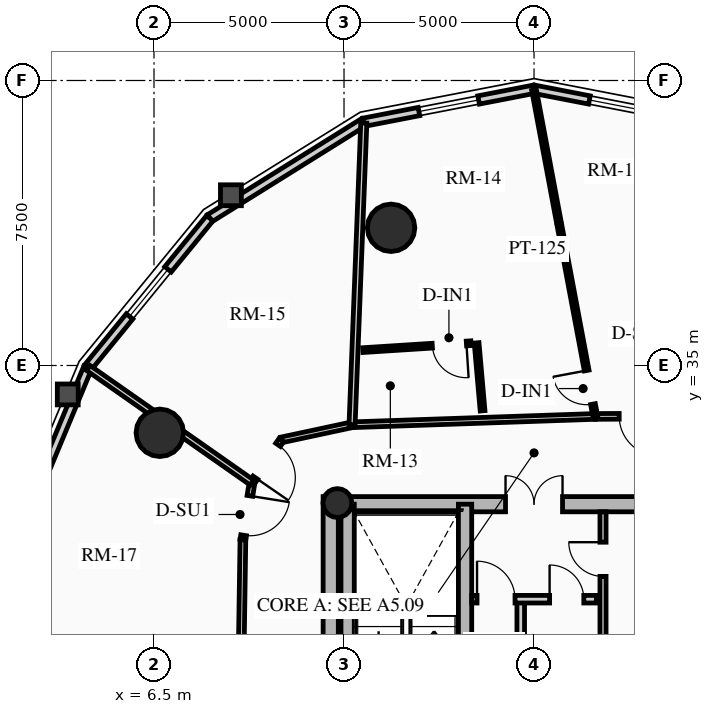
"""IFC4 building model, lengths in metres.
Left out: names, types, materials, properties, quantities, classifications, styles, units other than length and angle.
Written with IfcOpenShell. Run it as: python <this file> out.ifc"""

import sys

from ifc_helpers import new_model, si_unit, direction, frame, frame_2d, origin, origin_2d, place, context, subcontext, project, spatial, rectangle, circle, hollow_circle, extrude, source, transform, mapped, element, fill, save


model = new_model("IFC4")
c1 = context("Model", 3, precision=1e-05, world=origin(), true_north=direction((0.0, 1.0)))
c2 = subcontext(c1, "Body", "Model", "MODEL_VIEW")
j1 = project(units=[si_unit("LENGTHUNIT", "METRE"), si_unit("PLANEANGLEUNIT", "RADIAN")], contexts=[c1])
p1 = place(None, origin())
s1 = spatial("IfcSite", under=j1, at=p1, CompositionType="ELEMENT")
p2 = place(p1, origin())
s2 = spatial("IfcBuilding", under=s1, at=p2, CompositionType="ELEMENT")
p3 = place(p2, frame((0.0, 0.0, 157.42)))
s3 = spatial("IfcBuildingStorey", under=s2, at=p3, CompositionType="ELEMENT", Elevation=157.42)
p4 = place(p3, frame((11.15, 17.45, 0.0), z_axis=(0.0, 0.0, 1.0), x_axis=(0.0, 1.0, 0.0)))
e1 = element("IfcWall", 1, at=p4, inside=s3, PredefinedType="SHEAR", context=c2, shape_type="SweptSolid", body=[
    extrude(rectangle(XDim=14.1, YDim=0.4, at=frame_2d((7.05, 0.0))), origin(), (0.0, 0.0, 1.0), 2.91),
])
p5 = place(p3, frame((11.15, 31.35, 0.0), z_axis=(0.0, 0.0, 1.0), x_axis=(1.0, 0.0, 0.0)))
e2 = element("IfcWall", 2, at=p5, inside=s3, PredefinedType="SHEAR", context=c2, shape_type="SweptSolid", body=[
    extrude(rectangle(XDim=10.7, YDim=0.4, at=frame_2d((5.35, 0.0))), origin(), (0.0, 0.0, 1.0), 2.91),
])
m1 = source(origin(), c2, "Body", "SweptSolid", [
    extrude(rectangle(XDim=1.5, YDim=2.02, at=frame_2d((0.75, 1.01))), frame((0.0, 0.21, 0.0), z_axis=(0.0, -1.0, 0.0), x_axis=(1.0, 0.0, 0.0)), (0.0, 0.0, 1.0), 0.42),
])
p6 = place(p5, frame((4.6, 0.0, 0.0)))
e3 = element("IfcOpeningElement", 3, at=p6, cuts=e2, PredefinedType="OPENING", context=c2, shape_type="MappedRepresentation", body=[
    mapped(m1, transform((0.0, 0.0, 0.0), x_axis=(1.0, 0.0, 0.0), y_axis=(0.0, 1.0, 0.0), z_axis=(0.0, 0.0, 1.0), scale=1.0)),
])
p7 = place(p3, frame((14.685, 17.65, 0.0), z_axis=(0.0, 0.0, 1.0), x_axis=(0.0, 1.0, 0.0)))
e4 = element("IfcWall", 4, at=p7, inside=s3, PredefinedType="SHEAR", context=c2, shape_type="SweptSolid", body=[
    extrude(rectangle(XDim=13.7, YDim=0.35, at=frame_2d((6.85, 0.0))), origin(), (0.0, 0.0, 1.0), 2.91),
])
m2 = source(origin(), c2, "Body", "SweptSolid", [
    extrude(rectangle(XDim=1.1, YDim=2.015, at=frame_2d((0.55, 1.007))), frame((0.0, 0.185, 0.0), z_axis=(0.0, -1.0, 0.0), x_axis=(1.0, 0.0, 0.0)), (0.0, 0.0, 1.0), 0.37),
])
p8 = place(p7, frame((4.85, 0.0, 0.0)))
e5 = element("IfcOpeningElement", 5, at=p8, cuts=e4, PredefinedType="OPENING", context=c2, shape_type="MappedRepresentation", body=[
    mapped(m2, transform((0.0, 0.0, 0.0), x_axis=(1.0, 0.0, 0.0), y_axis=(0.0, 1.0, 0.0), z_axis=(0.0, 0.0, 1.0), scale=1.0)),
])
p9 = place(p7, frame((0.625, 0.0, 0.0)))
e6 = element("IfcOpeningElement", 6, at=p9, cuts=e4, PredefinedType="OPENING", context=c2, shape_type="MappedRepresentation", body=[
    mapped(m2, transform((0.0, 0.0, 0.0), x_axis=(1.0, 0.0, 0.0), y_axis=(0.0, 1.0, 0.0), z_axis=(0.0, 0.0, 1.0), scale=1.0)),
])
p10 = place(p7, frame((2.625, 0.0, 0.0)))
e7 = element("IfcOpeningElement", 7, at=p10, cuts=e4, PredefinedType="OPENING", context=c2, shape_type="MappedRepresentation", body=[
    mapped(m2, transform((0.0, 0.0, 0.0), x_axis=(1.0, 0.0, 0.0), y_axis=(0.0, 1.0, 0.0), z_axis=(0.0, 0.0, 1.0), scale=1.0)),
])
m3 = source(origin(), c2, "Body", "SweptSolid", [
    extrude(rectangle(XDim=1.15, YDim=2.02, at=frame_2d((0.575, 1.01))), frame((0.0, 0.185, 0.0), z_axis=(0.0, -1.0, 0.0), x_axis=(1.0, 0.0, 0.0)), (0.0, 0.0, 1.0), 0.37),
])
p11 = place(p7, frame((7.27, 0.0, 0.0)))
e8 = element("IfcOpeningElement", 8, at=p11, cuts=e4, PredefinedType="OPENING", context=c2, shape_type="MappedRepresentation", body=[
    mapped(m3, transform((0.0, 0.0, 0.0), x_axis=(1.0, 0.0, 0.0), y_axis=(0.0, 1.0, 0.0), z_axis=(0.0, 0.0, 1.0), scale=1.0)),
])
p12 = place(p3, frame((11.595, 24.655, 0.0), z_axis=(0.0, 0.0, 1.0), x_axis=(0.0, 1.0, 0.0)))
e9 = element("IfcWall", 9, at=p12, inside=s3, PredefinedType="SHEAR", context=c2, shape_type="SweptSolid", body=[
    extrude(rectangle(XDim=6.695, YDim=0.35, at=frame_2d((3.348, 0.0))), origin(), (0.0, 0.0, 1.0), 2.91),
])
p13 = place(p3, frame((11.325, 31.38, 0.0), z_axis=(0.0, 0.0, 1.0), x_axis=(1.0, 0.0, 0.0)))
e10 = element("IfcColumn", 10, at=p13, inside=s3, PredefinedType="COLUMN", context=c2, shape_type="SweptSolid", body=[
    extrude(hollow_circle(Radius=0.38, WallThickness=0.032, at=origin_2d()), origin(), (0.0, 0.0, 1.0), 2.91),
])
for number, where, z_axis, x_axis in (
    (11, (12.739, 38.623, 0.0), (0.0, 0.0, 1.0), (1.0, 0.0, 0.0)),
    (12, (6.653, 33.229, 0.0), (0.0, 0.0, 1.0), (1.0, 0.0, 0.0)),
):
    element("IfcColumn", number, at=place(p3, frame(where, z_axis=z_axis, x_axis=x_axis)), inside=s3, PredefinedType="USERDEFINED", context=c2, shape_type="SweptSolid", body=[
        extrude(circle(Radius=0.625, at=origin_2d()), origin(), (0.0, 0.0, 1.0), 2.91),
    ])
p14 = place(p3, frame((16.5, 42.27, 0.0), z_axis=(0.0, 0.0, 1.0), x_axis=(0.981718699963, -0.190337579429, 0.0)))
e13 = element("IfcWall", 13, at=p14, inside=s3, PredefinedType="SOLIDWALL", context=c2, shape_type="SweptSolid", body=[
    extrude(rectangle(XDim=4.569, YDim=0.22, at=frame_2d((2.284, 0.0))), origin(), (0.0, 0.0, 1.0), 2.245),
])
m4 = source(origin(), c2, "Body", "SweptSolid", [
    extrude(rectangle(XDim=1.6, YDim=1.3, at=frame_2d((0.8, 0.65))), frame((0.0, 0.12, 0.0), z_axis=(0.0, -1.0, 0.0), x_axis=(1.0, 0.0, 0.0)), (0.0, 0.0, 1.0), 0.24),
])
p15 = place(p14, frame((1.484, 0.0, 0.65)))
e14 = element("IfcOpeningElement", 14, at=p15, cuts=e13, PredefinedType="OPENING", context=c2, shape_type="MappedRepresentation", body=[
    mapped(m4, transform((0.0, 0.0, 0.0), x_axis=(1.0, 0.0, 0.0), y_axis=(0.0, 1.0, 0.0), z_axis=(0.0, 0.0, 1.0), scale=1.0)),
])
p16 = place(p3, frame((12.015, 41.4, 0.0), z_axis=(0.0, 0.0, 1.0), x_axis=(0.981718699963, 0.190337579429, 0.0)))
e15 = element("IfcWall", 15, at=p16, inside=s3, PredefinedType="SOLIDWALL", context=c2, shape_type="SweptSolid", body=[
    extrude(rectangle(XDim=4.569, YDim=0.22, at=frame_2d((2.284, 0.0))), origin(), (0.0, 0.0, 1.0), 2.245),
])
p17 = place(p16, frame((1.484, 0.0, 0.65)))
e16 = element("IfcOpeningElement", 16, at=p17, cuts=e15, PredefinedType="OPENING", context=c2, shape_type="MappedRepresentation", body=[
    mapped(m4, transform((0.0, 0.0, 0.0), x_axis=(1.0, 0.0, 0.0), y_axis=(0.0, 1.0, 0.0), z_axis=(0.0, 0.0, 1.0), scale=1.0)),
])
p18 = place(p3, frame((7.968, 38.876, 0.0), z_axis=(0.0, 0.0, 1.0), x_axis=(0.848452391194, 0.529271707044, 0.0)))
e17 = element("IfcWall", 17, at=p18, inside=s3, PredefinedType="SOLIDWALL", context=c2, shape_type="SweptSolid", body=[
    extrude(rectangle(XDim=4.769, YDim=0.22, at=frame_2d((2.385, 0.0))), origin(), (0.0, 0.0, 1.0), 2.245),
])
p19 = place(p3, frame((4.757, 34.945, 0.0), z_axis=(0.0, 0.0, 1.0), x_axis=(0.632598524901, 0.774479894053, 0.0)))
e18 = element("IfcWall", 18, at=p19, inside=s3, PredefinedType="SOLIDWALL", context=c2, shape_type="SweptSolid", body=[
    extrude(rectangle(XDim=5.076, YDim=0.22, at=frame_2d((2.538, 0.0))), origin(), (0.0, 0.0, 1.0), 2.245),
])
p20 = place(p19, frame((1.738, 0.0, 0.65)))
e19 = element("IfcOpeningElement", 19, at=p20, cuts=e18, PredefinedType="OPENING", context=c2, shape_type="MappedRepresentation", body=[
    mapped(m4, transform((0.0, 0.0, 0.0), x_axis=(1.0, 0.0, 0.0), y_axis=(0.0, 1.0, 0.0), z_axis=(0.0, 0.0, 1.0), scale=1.0)),
])
p21 = place(p3, frame((2.695, 29.991, 0.0), z_axis=(0.0, 0.0, 1.0), x_axis=(0.384259959969, 0.923224936386, 0.0)))
e20 = element("IfcWall", 20, at=p21, inside=s3, PredefinedType="SOLIDWALL", context=c2, shape_type="SweptSolid", body=[
    extrude(rectangle(XDim=5.365, YDim=0.22, at=frame_2d((2.683, 0.0))), origin(), (0.0, 0.0, 1.0), 2.245),
])
p22 = place(p3, frame((16.15, 26.45, 0.0), z_axis=(0.0, 0.0, 1.0), x_axis=(0.0, 1.0, 0.0)))
e21 = element("IfcWall", 21, at=p22, inside=s3, PredefinedType="PARTITIONING", context=c2, shape_type="SweptSolid", body=[
    extrude(rectangle(XDim=2.4, YDim=0.2, at=frame_2d((1.2, 0.0))), origin(), (0.0, 0.0, 1.0), 2.675),
])
p23 = place(p3, frame((14.86, 28.85, 0.0), z_axis=(0.0, 0.0, 1.0), x_axis=(1.0, 0.0, 0.0)))
e22 = element("IfcWall", 22, at=p23, inside=s3, PredefinedType="PARTITIONING", context=c2, shape_type="SweptSolid", body=[
    extrude(rectangle(XDim=3.28, YDim=0.2, at=frame_2d((1.64, 0.0))), origin(), (0.0, 0.0, 1.0), 2.675),
])
m5 = source(origin(), c2, "Body", "SweptSolid", [
    extrude(rectangle(XDim=1.0, YDim=2.015, at=frame_2d((0.5, 1.007))), frame((0.0, 0.11, 0.0), z_axis=(0.0, -1.0, 0.0), x_axis=(1.0, 0.0, 0.0)), (0.0, 0.0, 1.0), 0.22),
])
p24 = place(p23, frame((0.14, 0.0, 0.0)))
e23 = element("IfcOpeningElement", 23, at=p24, cuts=e22, PredefinedType="OPENING", context=c2, shape_type="MappedRepresentation", body=[
    mapped(m5, transform((0.0, 0.0, 0.0), x_axis=(1.0, 0.0, 0.0), y_axis=(0.0, 1.0, 0.0), z_axis=(0.0, 0.0, 1.0), scale=1.0)),
])
m6 = source(origin(), c2, "Body", "SweptSolid", [
    extrude(rectangle(XDim=0.9, YDim=2.005, at=frame_2d((0.45, 1.002))), frame((0.0, 0.11, 0.0), z_axis=(0.0, -1.0, 0.0), x_axis=(1.0, 0.0, 0.0)), (0.0, 0.0, 1.0), 0.22),
])
p25 = place(p23, frame((2.05, 0.0, 0.0)))
e24 = element("IfcOpeningElement", 24, at=p25, cuts=e22, PredefinedType="OPENING", context=c2, shape_type="MappedRepresentation", body=[
    mapped(m6, transform((0.0, 0.0, 0.0), x_axis=(1.0, 0.0, 0.0), y_axis=(0.0, 1.0, 0.0), z_axis=(0.0, 0.0, 1.0), scale=1.0)),
])
p26 = place(p3, frame((18.315, 27.25, 0.0), z_axis=(0.0, 0.0, 1.0), x_axis=(0.0, 1.0, 0.0)))
e25 = element("IfcWall", 25, at=p26, inside=s3, PredefinedType="PARTITIONING", context=c2, shape_type="SweptSolid", body=[
    extrude(rectangle(XDim=3.9, YDim=0.16, at=frame_2d((1.95, 0.0))), origin(), (0.0, 0.0, 1.0), 2.675),
])
m7 = source(origin(), c2, "Body", "SweptSolid", [
    extrude(rectangle(XDim=0.9, YDim=2.005, at=frame_2d((0.45, 1.002))), frame((0.0, 0.09, 0.0), z_axis=(0.0, -1.0, 0.0), x_axis=(1.0, 0.0, 0.0)), (0.0, 0.0, 1.0), 0.18),
])
p27 = place(p26, frame((2.2, 0.0, 0.0)))
e26 = element("IfcOpeningElement", 26, at=p27, cuts=e25, PredefinedType="OPENING", context=c2, shape_type="MappedRepresentation", body=[
    mapped(m7, transform((0.0, 0.0, 0.0), x_axis=(1.0, 0.0, 0.0), y_axis=(0.0, 1.0, 0.0), z_axis=(0.0, 0.0, 1.0), scale=1.0)),
])
p28 = place(p3, frame((21.435, 33.677, 0.0), z_axis=(0.0, 0.0, 1.0), x_axis=(-0.999986775557, -0.005142831114, 0.0)))
e27 = element("IfcWall", 27, at=p28, inside=s3, PredefinedType="PARTITIONING", context=c2, shape_type="SweptSolid", body=[
    extrude(rectangle(XDim=3.323, YDim=0.15, at=frame_2d((1.662, 0.0))), origin(), (0.0, 0.0, 1.0), 2.245),
])
m8 = source(origin(), c2, "Body", "SweptSolid", [
    extrude(rectangle(XDim=1.05, YDim=2.015, at=frame_2d((0.525, 1.007))), frame((0.0, 0.085, 0.0), z_axis=(0.0, -1.0, 0.0), x_axis=(1.0, 0.0, 0.0)), (0.0, 0.0, 1.0), 0.17),
])
p29 = place(p28, frame((1.645, 0.0, 0.0)))
e28 = element("IfcOpeningElement", 28, at=p29, cuts=e27, PredefinedType="OPENING", context=c2, shape_type="MappedRepresentation", body=[
    mapped(m8, transform((0.0, 0.0, 0.0), x_axis=(1.0, 0.0, 0.0), y_axis=(0.0, 1.0, 0.0), z_axis=(0.0, 0.0, 1.0), scale=1.0)),
])
p30 = place(p3, frame((18.112, 33.659, 0.0), z_axis=(0.0, 0.0, 1.0), x_axis=(-0.999413895918, -0.034232508622, 0.0)))
e29 = element("IfcWall", 29, at=p30, inside=s3, PredefinedType="PARTITIONING", context=c2, shape_type="SweptSolid", body=[
    extrude(rectangle(XDim=6.404, YDim=0.15, at=frame_2d((3.202, 0.0))), origin(), (0.0, 0.0, 1.0), 2.245),
])
p31 = place(p3, frame((11.712, 33.44, 0.0), z_axis=(0.0, 0.0, 1.0), x_axis=(-0.977753514213, -0.209757158265, 0.0)))
e30 = element("IfcWall", 30, at=p31, inside=s3, PredefinedType="PARTITIONING", context=c2, shape_type="SweptSolid", body=[
    extrude(rectangle(XDim=1.901, YDim=0.15, at=frame_2d((0.95, 0.0))), origin(), (0.0, 0.0, 1.0), 2.245),
])
p32 = place(p3, frame((9.853, 33.042, 0.0), z_axis=(0.0, 0.0, 1.0), x_axis=(-0.567189283521, -0.823587467522, 0.0)))
e31 = element("IfcWall", 31, at=p32, inside=s3, PredefinedType="PARTITIONING", context=c2, shape_type="SweptSolid", body=[
    extrude(rectangle(XDim=1.365, YDim=0.15, at=frame_2d((0.682, 0.0))), origin(), (0.0, 0.0, 1.0), 2.245),
])
p33 = place(p32, frame((0.157, 0.0, 0.0)))
e32 = element("IfcOpeningElement", 32, at=p33, cuts=e31, PredefinedType="OPENING", context=c2, shape_type="MappedRepresentation", body=[
    mapped(m8, transform((0.0, 0.0, 0.0), x_axis=(1.0, 0.0, 0.0), y_axis=(0.0, 1.0, 0.0), z_axis=(0.0, 0.0, 1.0), scale=1.0)),
])
p34 = place(p3, frame((9.079, 31.918, 0.0), z_axis=(0.0, 0.0, 1.0), x_axis=(-0.15742775293, -0.987530507178, 0.0)))
e33 = element("IfcWall", 33, at=p34, inside=s3, PredefinedType="PARTITIONING", context=c2, shape_type="SweptSolid", body=[
    extrude(rectangle(XDim=1.523, YDim=0.15, at=frame_2d((0.761, 0.0))), origin(), (0.0, 0.0, 1.0), 2.245),
])
p35 = place(p34, frame((0.353, 0.0, 0.0)))
e34 = element("IfcOpeningElement", 34, at=p35, cuts=e33, PredefinedType="OPENING", context=c2, shape_type="MappedRepresentation", body=[
    mapped(m8, transform((0.0, 0.0, 0.0), x_axis=(1.0, 0.0, 0.0), y_axis=(0.0, 1.0, 0.0), z_axis=(0.0, 0.0, 1.0), scale=1.0)),
])
p36 = place(p3, frame((8.84, 30.414, 0.0), z_axis=(0.0, 0.0, 1.0), x_axis=(-0.01514915101, -0.999885245027, 0.0)))
e35 = element("IfcWall", 35, at=p36, inside=s3, PredefinedType="PARTITIONING", context=c2, shape_type="SweptSolid", body=[
    extrude(rectangle(XDim=5.915, YDim=0.15, at=frame_2d((2.957, 0.0))), origin(), (0.0, 0.0, 1.0), 2.675),
])
p37 = place(p3, frame((11.712, 33.44, 0.0), z_axis=(0.0, 0.0, 1.0), x_axis=(0.038892064024, 0.999243417469, 0.0)))
e36 = element("IfcWall", 36, at=p37, inside=s3, PredefinedType="PARTITIONING", context=c2, shape_type="SweptSolid", body=[
    extrude(rectangle(XDim=7.947, YDim=0.16, at=frame_2d((3.974, 0.0))), origin(), (0.0, 0.0, 1.0), 2.245),
])
p38 = place(p3, frame((9.079, 31.918, 0.0), z_axis=(0.0, 0.0, 1.0), x_axis=(-0.819135909075, 0.573599479135, 0.0)))
e37 = element("IfcWall", 37, at=p38, inside=s3, PredefinedType="PARTITIONING", context=c2, shape_type="SweptSolid", body=[
    extrude(rectangle(XDim=5.257, YDim=0.16, at=frame_2d((2.628, 0.0))), origin(), (0.0, 0.0, 1.0), 2.245),
])
p39 = place(p3, frame((18.112, 33.659, 0.0), z_axis=(0.0, 0.0, 1.0), x_axis=(-0.18446223694, 0.982839601941, 0.0)))
e38 = element("IfcWall", 38, at=p39, inside=s3, PredefinedType="PARTITIONING", context=c2, shape_type="SweptSolid", body=[
    extrude(rectangle(XDim=8.74, YDim=0.125, at=frame_2d((4.37, 0.0))), origin(), (0.0, 0.0, 1.0), 2.245),
])
m9 = source(origin(), c2, "Body", "SweptSolid", [
    extrude(rectangle(XDim=0.9, YDim=2.005, at=frame_2d((0.45, 1.002))), frame((0.0, 0.073, 0.0), z_axis=(0.0, -1.0, 0.0), x_axis=(1.0, 0.0, 0.0)), (0.0, 0.0, 1.0), 0.145),
])
p40 = place(p39, frame((0.33, 0.0, 0.0)))
e39 = element("IfcOpeningElement", 39, at=p40, cuts=e38, PredefinedType="OPENING", context=c2, shape_type="MappedRepresentation", body=[
    mapped(m9, transform((0.0, 0.0, 0.0), x_axis=(1.0, 0.0, 0.0), y_axis=(0.0, 1.0, 0.0), z_axis=(0.0, 0.0, 1.0), scale=1.0)),
])
p41 = place(p3, frame((15.146, 33.807, 0.0), z_axis=(0.0, 0.0, 1.0), x_axis=(-0.087433462003, 0.996170361797, 0.0)))
e40 = element("IfcWall", 40, at=p41, inside=s3, PredefinedType="PARTITIONING", context=c2, shape_type="SweptSolid", body=[
    extrude(rectangle(XDim=1.795, YDim=0.125, at=frame_2d((0.898, 0.0))), origin(), (0.0, 0.0, 1.0), 2.675),
])
p42 = place(p3, frame((14.841, 35.586, 0.0), z_axis=(0.0, 0.0, 1.0), x_axis=(-0.997963636416, -0.063785424599, 0.0)))
e41 = element("IfcWall", 41, at=p42, inside=s3, PredefinedType="PARTITIONING", context=c2, shape_type="SweptSolid", body=[
    extrude(rectangle(XDim=2.852, YDim=0.125, at=frame_2d((1.426, 0.0))), origin(), (0.0, 0.0, 1.0), 2.245),
])
p43 = place(p42, frame((0.12, 0.0, 0.0)))
e42 = element("IfcOpeningElement", 42, at=p43, cuts=e41, PredefinedType="OPENING", context=c2, shape_type="MappedRepresentation", body=[
    mapped(m9, transform((0.0, 0.0, 0.0), x_axis=(1.0, 0.0, 0.0), y_axis=(0.0, 1.0, 0.0), z_axis=(0.0, 0.0, 1.0), scale=1.0)),
])
m10 = source(origin(), c2, "Body", "SweptSolid", [
    extrude(rectangle(XDim=1.6, YDim=1.3, at=frame_2d((0.8, 0.65))), frame((0.0, 0.03, 0.0), z_axis=(0.0, -1.0, 0.0), x_axis=(1.0, 0.0, 0.0)), (0.0, 0.0, 1.0), 0.06),
])
p44 = place(p15, origin())
e43 = element("IfcWindow", 43, at=p44, inside=s3, PartitioningType="SINGLE_PANEL", PredefinedType="WINDOW", context=c2, shape_type="MappedRepresentation", body=[
    mapped(m10, transform((0.0, 0.0, 0.0), x_axis=(1.0, 0.0, 0.0), y_axis=(0.0, 1.0, 0.0), z_axis=(0.0, 0.0, 1.0), scale=1.0)),
])
fill(e14, e43)
p45 = place(p17, origin())
e44 = element("IfcWindow", 44, at=p45, inside=s3, PartitioningType="SINGLE_PANEL", PredefinedType="WINDOW", context=c2, shape_type="MappedRepresentation", body=[
    mapped(m10, transform((0.0, 0.0, 0.0), x_axis=(1.0, 0.0, 0.0), y_axis=(0.0, 1.0, 0.0), z_axis=(0.0, 0.0, 1.0), scale=1.0)),
])
fill(e16, e44)
p46 = place(p20, origin())
e45 = element("IfcWindow", 45, at=p46, inside=s3, PartitioningType="SINGLE_PANEL", PredefinedType="WINDOW", context=c2, shape_type="MappedRepresentation", body=[
    mapped(m10, transform((0.0, 0.0, 0.0), x_axis=(1.0, 0.0, 0.0), y_axis=(0.0, 1.0, 0.0), z_axis=(0.0, 0.0, 1.0), scale=1.0)),
])
fill(e19, e45)
m11 = source(origin(), c2, "Body", "SweptSolid", [
    extrude(rectangle(XDim=1.5, YDim=2.02, at=frame_2d((0.75, 1.01))), frame((0.0, 0.025, 0.0), z_axis=(0.0, -1.0, 0.0), x_axis=(1.0, 0.0, 0.0)), (0.0, 0.0, 1.0), 0.05),
])
p47 = place(p6, origin())
e46 = element("IfcDoor", 46, at=p47, inside=s3, OperationType="DOUBLE_DOOR_SINGLE_SWING", PredefinedType="DOOR", context=c2, shape_type="MappedRepresentation", body=[
    mapped(m11, transform((0.0, 0.0, 0.0), x_axis=(1.0, 0.0, 0.0), y_axis=(0.0, 1.0, 0.0), z_axis=(0.0, 0.0, 1.0), scale=1.0)),
])
fill(e3, e46)
m12 = source(origin(), c2, "Body", "SweptSolid", [
    extrude(rectangle(XDim=1.0, YDim=2.015, at=frame_2d((0.5, 1.007))), frame((0.0, 0.025, 0.0), z_axis=(0.0, -1.0, 0.0), x_axis=(1.0, 0.0, 0.0)), (0.0, 0.0, 1.0), 0.05),
])
p48 = place(p24, origin())
e47 = element("IfcDoor", 47, at=p48, inside=s3, OperationType="SINGLE_SWING_LEFT", PredefinedType="DOOR", context=c2, shape_type="MappedRepresentation", body=[
    mapped(m12, transform((0.0, 0.0, 0.0), x_axis=(1.0, 0.0, 0.0), y_axis=(0.0, 1.0, 0.0), z_axis=(0.0, 0.0, 1.0), scale=1.0)),
])
fill(e23, e47)
m13 = source(origin(), c2, "Body", "SweptSolid", [
    extrude(rectangle(XDim=0.9, YDim=2.005, at=frame_2d((0.45, 1.002))), frame((0.0, 0.025, 0.0), z_axis=(0.0, -1.0, 0.0), x_axis=(1.0, 0.0, 0.0)), (0.0, 0.0, 1.0), 0.05),
])
p49 = place(p25, origin())
e48 = element("IfcDoor", 48, at=p49, inside=s3, OperationType="SINGLE_SWING_LEFT", PredefinedType="DOOR", context=c2, shape_type="MappedRepresentation", body=[
    mapped(m13, transform((0.0, 0.0, 0.0), x_axis=(1.0, 0.0, 0.0), y_axis=(0.0, 1.0, 0.0), z_axis=(0.0, 0.0, 1.0), scale=1.0)),
])
fill(e24, e48)
p50 = place(p27, origin())
e49 = element("IfcDoor", 49, at=p50, inside=s3, OperationType="SINGLE_SWING_RIGHT", PredefinedType="DOOR", context=c2, shape_type="MappedRepresentation", body=[
    mapped(m13, transform((0.0, 0.0, 0.0), x_axis=(1.0, 0.0, 0.0), y_axis=(0.0, 1.0, 0.0), z_axis=(0.0, 0.0, 1.0), scale=1.0)),
])
fill(e26, e49)
m14 = source(origin(), c2, "Body", "SweptSolid", [
    extrude(rectangle(XDim=1.05, YDim=2.015, at=frame_2d((0.525, 1.007))), frame((0.0, 0.025, 0.0), z_axis=(0.0, -1.0, 0.0), x_axis=(1.0, 0.0, 0.0)), (0.0, 0.0, 1.0), 0.05),
])
p51 = place(p29, origin())
e50 = element("IfcDoor", 50, at=p51, inside=s3, OperationType="SINGLE_SWING_LEFT", PredefinedType="DOOR", context=c2, shape_type="MappedRepresentation", body=[
    mapped(m14, transform((0.0, 0.0, 0.0), x_axis=(1.0, 0.0, 0.0), y_axis=(0.0, 1.0, 0.0), z_axis=(0.0, 0.0, 1.0), scale=1.0)),
])
fill(e28, e50)
p52 = place(p40, origin())
e51 = element("IfcDoor", 51, at=p52, inside=s3, OperationType="SINGLE_SWING_RIGHT", PredefinedType="DOOR", context=c2, shape_type="MappedRepresentation", body=[
    mapped(m13, transform((0.0, 0.0, 0.0), x_axis=(1.0, 0.0, 0.0), y_axis=(0.0, 1.0, 0.0), z_axis=(0.0, 0.0, 1.0), scale=1.0)),
])
fill(e39, e51)
p53 = place(p43, origin())
e52 = element("IfcDoor", 52, at=p53, inside=s3, OperationType="SINGLE_SWING_LEFT", PredefinedType="DOOR", context=c2, shape_type="MappedRepresentation", body=[
    mapped(m13, transform((0.0, 0.0, 0.0), x_axis=(1.0, 0.0, 0.0), y_axis=(0.0, 1.0, 0.0), z_axis=(0.0, 0.0, 1.0), scale=1.0)),
])
fill(e42, e52)
p54 = place(p33, origin())
e53 = element("IfcDoor", 53, at=p54, inside=s3, OperationType="SINGLE_SWING_RIGHT", PredefinedType="DOOR", context=c2, shape_type="MappedRepresentation", body=[
    mapped(m14, transform((0.0, 0.0, 0.0), x_axis=(1.0, 0.0, 0.0), y_axis=(0.0, 1.0, 0.0), z_axis=(0.0, 0.0, 1.0), scale=1.0)),
])
fill(e32, e53)
p55 = place(p35, origin())
e54 = element("IfcDoor", 54, at=p55, inside=s3, OperationType="SINGLE_SWING_LEFT", PredefinedType="DOOR", context=c2, shape_type="MappedRepresentation", body=[
    mapped(m14, transform((0.0, 0.0, 0.0), x_axis=(1.0, 0.0, 0.0), y_axis=(0.0, 1.0, 0.0), z_axis=(0.0, 0.0, 1.0), scale=1.0)),
])
fill(e34, e54)
save(model, sys.argv[1])
